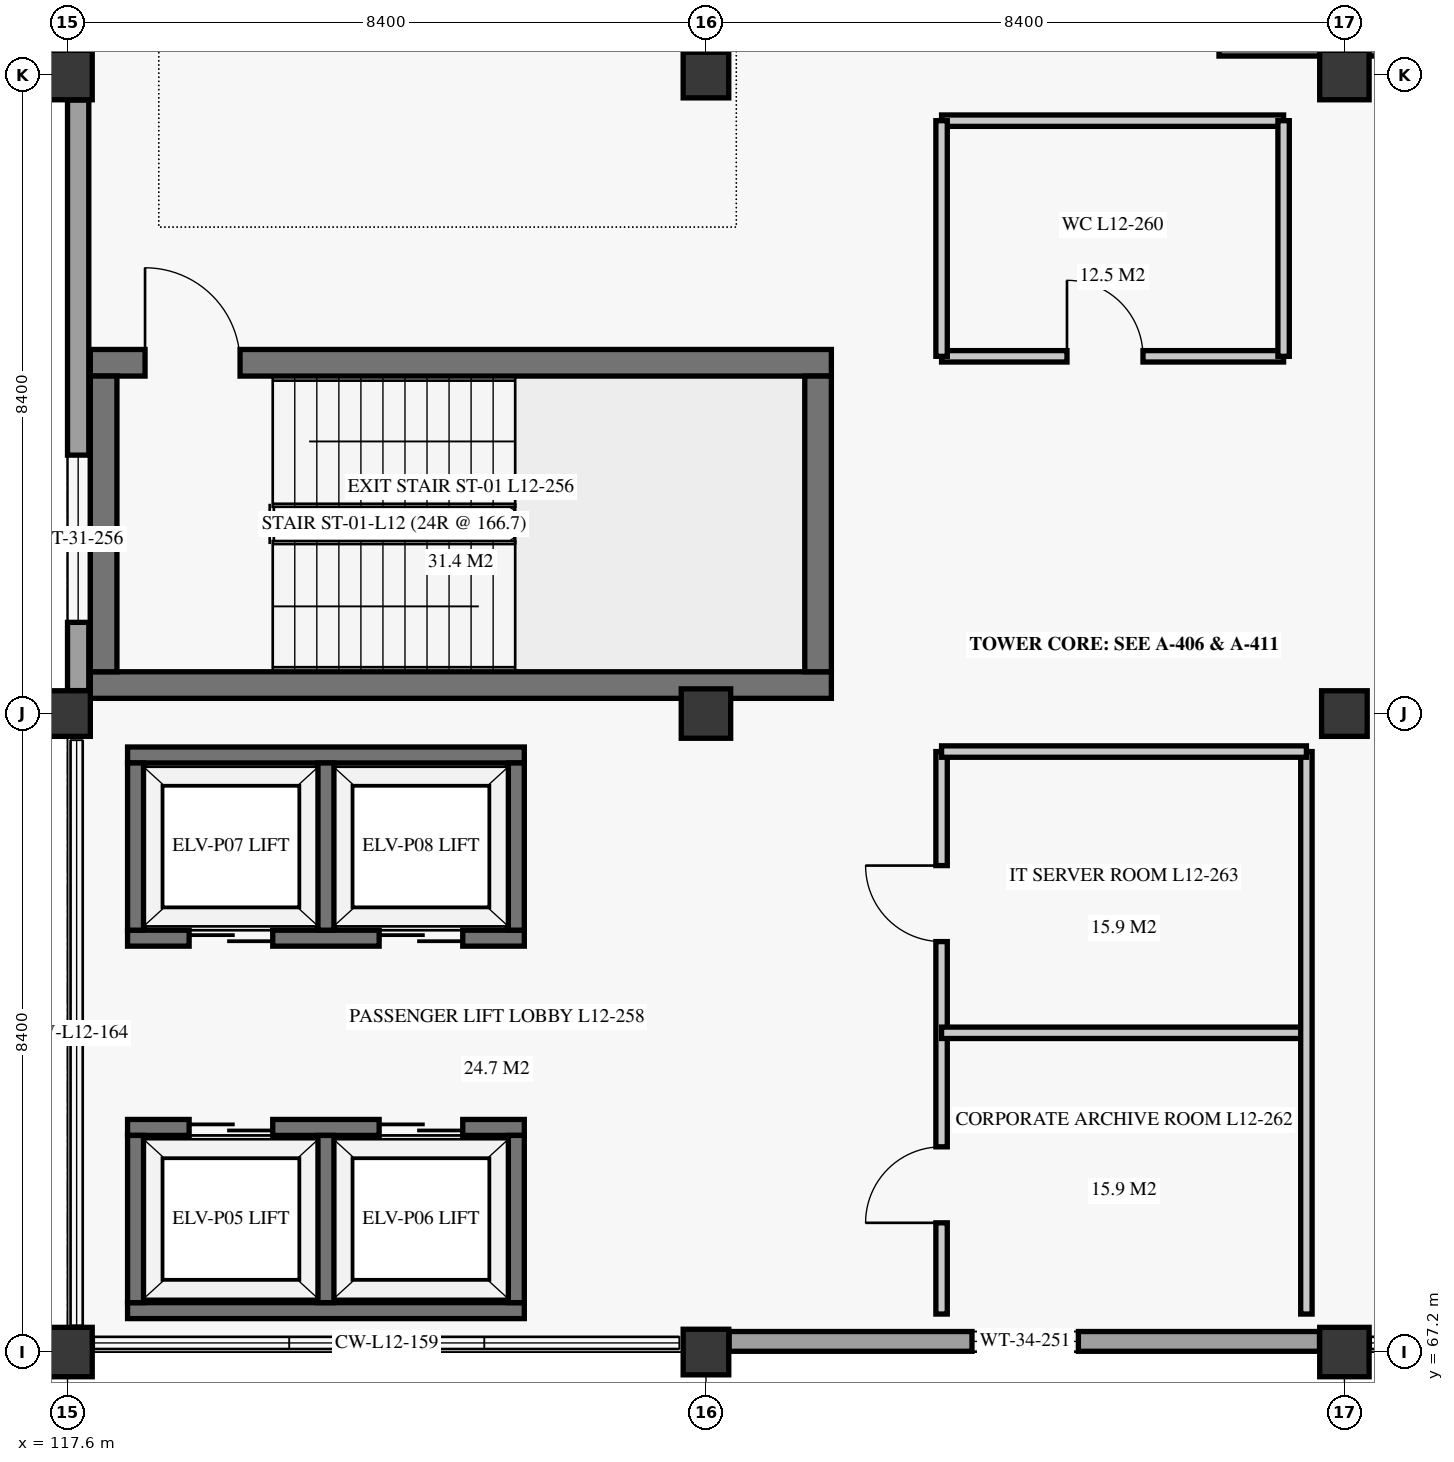
"""IFC4 building model, lengths in metres.
Left out: names, types, materials, properties, quantities, classifications, styles, units other than length and angle.
Written with IfcOpenShell. Run it as: python <this file> out.ifc"""

import sys

from ifc_helpers import new_model, si_unit, direction, frame, frame_2d, origin, origin_2d, place, context, subcontext, project, spatial, rectangle, extrude, element, fill, save


model = new_model("IFC4")
c1 = context("Model", 3, precision=1e-05, world=origin(), true_north=direction((0.0, 1.0)))
c2 = subcontext(c1, "Body", "Model", "MODEL_VIEW")
j1 = project(units=[si_unit("LENGTHUNIT", "METRE"), si_unit("PLANEANGLEUNIT", "RADIAN")], contexts=[c1])
p1 = place(None, origin())
s1 = spatial("IfcSite", under=j1, at=p1, CompositionType="ELEMENT")
p2 = place(p1, origin())
s2 = spatial("IfcBuilding", under=s1, at=p2, CompositionType="ELEMENT")
p3 = place(p2, frame((0.0, 0.0, 50.7)))
s3 = spatial("IfcBuildingStorey", under=s2, at=p3, CompositionType="ELEMENT", Elevation=50.7)
p4 = place(p3, frame((117.6, 67.2, 0.0), z_axis=(0.0, 0.0, 1.0), x_axis=(1.0, 0.0, 0.0)))
e1 = element("IfcColumn", 1, at=p4, inside=s3, PredefinedType="COLUMN", context=c2, shape_type="SweptSolid", body=[
    extrude(rectangle(XDim=0.65, YDim=0.65, at=origin_2d()), origin(), (0.0, 0.0, 1.0), 3.72),
])
p5 = place(p3, frame((117.6, 75.6, 0.0), z_axis=(0.0, 0.0, 1.0), x_axis=(1.0, 0.0, 0.0)))
e2 = element("IfcColumn", 2, at=p5, inside=s3, PredefinedType="COLUMN", context=c2, shape_type="SweptSolid", body=[
    extrude(rectangle(XDim=0.6, YDim=0.6, at=origin_2d()), origin(), (0.0, 0.0, 1.0), 3.72),
])
p6 = place(p3, frame((117.6, 84.0, 0.0), z_axis=(0.0, 0.0, 1.0), x_axis=(1.0, 0.0, 0.0)))
e3 = element("IfcColumn", 3, at=p6, inside=s3, PredefinedType="COLUMN", context=c2, shape_type="SweptSolid", body=[
    extrude(rectangle(XDim=0.65, YDim=0.65, at=origin_2d()), origin(), (0.0, 0.0, 1.0), 3.72),
])
p7 = place(p3, frame((126.0, 67.2, 0.0), z_axis=(0.0, 0.0, 1.0), x_axis=(1.0, 0.0, 0.0)))
e4 = element("IfcColumn", 4, at=p7, inside=s3, PredefinedType="COLUMN", context=c2, shape_type="SweptSolid", body=[
    extrude(rectangle(XDim=0.6, YDim=0.6, at=origin_2d()), origin(), (0.0, 0.0, 1.0), 3.72),
])
p8 = place(p3, frame((126.0, 75.6, 0.0), z_axis=(0.0, 0.0, 1.0), x_axis=(1.0, 0.0, 0.0)))
e5 = element("IfcColumn", 5, at=p8, inside=s3, PredefinedType="COLUMN", context=c2, shape_type="SweptSolid", body=[
    extrude(rectangle(XDim=0.65, YDim=0.65, at=origin_2d()), origin(), (0.0, 0.0, 1.0), 3.72),
])
p9 = place(p3, frame((126.0, 84.0, 0.0), z_axis=(0.0, 0.0, 1.0), x_axis=(1.0, 0.0, 0.0)))
e6 = element("IfcColumn", 6, at=p9, inside=s3, PredefinedType="COLUMN", context=c2, shape_type="SweptSolid", body=[
    extrude(rectangle(XDim=0.6, YDim=0.6, at=origin_2d()), origin(), (0.0, 0.0, 1.0), 3.72),
])
p10 = place(p3, frame((134.4, 67.2, 0.0), z_axis=(0.0, 0.0, 1.0), x_axis=(1.0, 0.0, 0.0)))
e7 = element("IfcColumn", 7, at=p10, inside=s3, PredefinedType="COLUMN", context=c2, shape_type="SweptSolid", body=[
    extrude(rectangle(XDim=0.65, YDim=0.65, at=origin_2d()), origin(), (0.0, 0.0, 1.0), 3.72),
])
p11 = place(p3, frame((134.4, 75.6, 0.0), z_axis=(0.0, 0.0, 1.0), x_axis=(1.0, 0.0, 0.0)))
e8 = element("IfcColumn", 8, at=p11, inside=s3, PredefinedType="COLUMN", context=c2, shape_type="SweptSolid", body=[
    extrude(rectangle(XDim=0.6, YDim=0.6, at=origin_2d()), origin(), (0.0, 0.0, 1.0), 3.72),
])
p12 = place(p3, frame((134.4, 84.0, 0.0), z_axis=(0.0, 0.0, 1.0), x_axis=(1.0, 0.0, 0.0)))
e9 = element("IfcColumn", 9, at=p12, inside=s3, PredefinedType="COLUMN", context=c2, shape_type="SweptSolid", body=[
    extrude(rectangle(XDim=0.65, YDim=0.65, at=origin_2d()), origin(), (0.0, 0.0, 1.0), 3.72),
])
p13 = place(p3, frame((126.304, 67.34, 0.0), z_axis=(0.0, 0.0, 1.0), x_axis=(1.0, 0.0, 0.0)))
e10 = element("IfcWall", 10, at=p13, inside=s3, PredefinedType="SOLIDWALL", context=c2, shape_type="SweptSolid", body=[
    extrude(rectangle(XDim=7.768, YDim=0.26, at=frame_2d((3.884, 0.0))), origin(), (0.0, 0.0, 1.0), 3.04),
])
p14 = place(p13, frame((3.196, 0.0, 0.85)))
e11 = element("IfcOpeningElement", 11, at=p14, cuts=e10, PredefinedType="OPENING", context=c2, shape_type="SweptSolid", body=[
    extrude(rectangle(XDim=1.4, YDim=1.7, at=frame_2d((0.7, 0.85))), frame((0.0, 0.14, 0.0), z_axis=(0.0, -1.0, 0.0), x_axis=(1.0, 0.0, 0.0)), (0.0, 0.0, 1.0), 0.28),
])
p15 = place(p3, frame((117.74, 75.902, 0.0), z_axis=(0.0, 0.0, 1.0), x_axis=(0.0, 1.0, 0.0)))
e12 = element("IfcWall", 12, at=p15, inside=s3, PredefinedType="SOLIDWALL", context=c2, shape_type="SweptSolid", body=[
    extrude(rectangle(XDim=7.77, YDim=0.28, at=frame_2d((3.885, 0.0))), origin(), (0.0, 0.0, 1.0), 3.04),
])
p16 = place(p15, frame((0.898, 0.0, 0.85)))
e13 = element("IfcOpeningElement", 13, at=p16, cuts=e12, PredefinedType="OPENING", context=c2, shape_type="SweptSolid", body=[
    extrude(rectangle(XDim=2.2, YDim=1.8, at=frame_2d((1.1, 0.9))), frame((0.0, 0.15, 0.0), z_axis=(0.0, -1.0, 0.0), x_axis=(1.0, 0.0, 0.0)), (0.0, 0.0, 1.0), 0.3),
])
p17 = place(p3, frame((117.9, 75.975, 0.0), z_axis=(0.0, 0.0, 1.0), x_axis=(1.0, 0.0, 0.0)))
e14 = element("IfcWall", 14, at=p17, inside=s3, PredefinedType="SHEAR", context=c2, shape_type="SweptSolid", body=[
    extrude(rectangle(XDim=9.75, YDim=0.35, at=frame_2d((4.875, 0.0))), origin(), (0.0, 0.0, 1.0), 3.72),
])
p18 = place(p3, frame((117.9, 80.215, 0.0), z_axis=(0.0, 0.0, 1.0), x_axis=(1.0, 0.0, 0.0)))
e15 = element("IfcWall", 15, at=p18, inside=s3, PredefinedType="SHEAR", context=c2, shape_type="SweptSolid", body=[
    extrude(rectangle(XDim=9.75, YDim=0.35, at=frame_2d((4.875, 0.0))), origin(), (0.0, 0.0, 1.0), 3.72),
])
p19 = place(p18, frame((0.72, 0.0, 0.0)))
e16 = element("IfcOpeningElement", 16, at=p19, cuts=e15, PredefinedType="OPENING", context=c2, shape_type="SweptSolid", body=[
    extrude(rectangle(XDim=1.25, YDim=2.2, at=frame_2d((0.625, 1.1))), frame((0.0, 0.185, 0.0), z_axis=(0.0, -1.0, 0.0), x_axis=(1.0, 0.0, 0.0)), (0.0, 0.0, 1.0), 0.37),
])
for number, where, z_axis, x_axis in (
    (17, (118.075, 76.15, 0.0), (0.0, 0.0, 1.0), (0.0, 1.0, 0.0)),
    (18, (127.475, 76.15, 0.0), (0.0, 0.0, 1.0), (0.0, 1.0, 0.0)),
):
    element("IfcWall", number, at=place(p3, frame(where, z_axis=z_axis, x_axis=x_axis)), inside=s3, PredefinedType="SHEAR", context=c2, shape_type="SweptSolid", body=[
        extrude(rectangle(XDim=3.89, YDim=0.35, at=frame_2d((1.945, 0.0))), origin(), (0.0, 0.0, 1.0), 3.72),
    ])
p20 = place(p3, frame((132.75, 84.425, 0.0), z_axis=(0.0, 0.0, 1.0), x_axis=(1.0, 0.0, 0.0)))
e19 = element("IfcWall", 19, at=p20, inside=s3, PredefinedType="SHEAR", context=c2, shape_type="SweptSolid", body=[
    extrude(rectangle(XDim=9.75, YDim=0.35, at=frame_2d((4.875, 0.0))), origin(), (0.0, 0.0, 1.0), 3.72),
])
p21 = place(p3, frame((118.39, 67.745, 0.0), z_axis=(0.0, 0.0, 1.0), x_axis=(1.0, 0.0, 0.0)))
e20 = element("IfcWall", 20, at=p21, inside=s3, PredefinedType="SHEAR", context=c2, shape_type="SweptSolid", body=[
    extrude(rectangle(XDim=5.22, YDim=0.21, at=frame_2d((2.61, 0.0))), origin(), (0.0, 0.0, 1.0), 3.72),
])
p22 = place(p3, frame((118.39, 70.155, 0.0), z_axis=(0.0, 0.0, 1.0), x_axis=(1.0, 0.0, 0.0)))
e21 = element("IfcWall", 21, at=p22, inside=s3, PredefinedType="SHEAR", context=c2, shape_type="SweptSolid", body=[
    extrude(rectangle(XDim=5.22, YDim=0.21, at=frame_2d((2.61, 0.0))), origin(), (0.0, 0.0, 1.0), 3.72),
])
p23 = place(p22, frame((0.81, 0.0, 0.0)))
e22 = element("IfcOpeningElement", 22, at=p23, cuts=e21, PredefinedType="OPENING", context=c2, shape_type="SweptSolid", body=[
    extrude(rectangle(XDim=1.1, YDim=2.15, at=frame_2d((0.55, 1.075))), frame((0.0, 0.115, 0.0), z_axis=(0.0, -1.0, 0.0), x_axis=(1.0, 0.0, 0.0)), (0.0, 0.0, 1.0), 0.23),
])
p24 = place(p22, frame((3.31, 0.0, 0.0)))
e23 = element("IfcOpeningElement", 23, at=p24, cuts=e21, PredefinedType="OPENING", context=c2, shape_type="SweptSolid", body=[
    extrude(rectangle(XDim=1.1, YDim=2.15, at=frame_2d((0.55, 1.075))), frame((0.0, 0.115, 0.0), z_axis=(0.0, -1.0, 0.0), x_axis=(1.0, 0.0, 0.0)), (0.0, 0.0, 1.0), 0.23),
])
for number, where, z_axis, x_axis in (
    (24, (118.495, 67.85, 0.0), (0.0, 0.0, 1.0), (0.0, 1.0, 0.0)),
    (25, (123.505, 67.85, 0.0), (0.0, 0.0, 1.0), (0.0, 1.0, 0.0)),
    (26, (121.0, 67.85, 0.0), (0.0, 0.0, 1.0), (0.0, 1.0, 0.0)),
):
    element("IfcWall", number, at=place(p3, frame(where, z_axis=z_axis, x_axis=x_axis)), inside=s3, PredefinedType="SHEAR", context=c2, shape_type="SweptSolid", body=[
        extrude(rectangle(XDim=2.2, YDim=0.21, at=frame_2d((1.1, 0.0))), origin(), (0.0, 0.0, 1.0), 3.72),
    ])
p25 = place(p3, frame((118.39, 72.645, 0.0), z_axis=(0.0, 0.0, 1.0), x_axis=(1.0, 0.0, 0.0)))
e27 = element("IfcWall", 27, at=p25, inside=s3, PredefinedType="SHEAR", context=c2, shape_type="SweptSolid", body=[
    extrude(rectangle(XDim=5.22, YDim=0.21, at=frame_2d((2.61, 0.0))), origin(), (0.0, 0.0, 1.0), 3.72),
])
p26 = place(p25, frame((0.81, 0.0, 0.0)))
e28 = element("IfcOpeningElement", 28, at=p26, cuts=e27, PredefinedType="OPENING", context=c2, shape_type="SweptSolid", body=[
    extrude(rectangle(XDim=1.1, YDim=2.15, at=frame_2d((0.55, 1.075))), frame((0.0, 0.115, 0.0), z_axis=(0.0, -1.0, 0.0), x_axis=(1.0, 0.0, 0.0)), (0.0, 0.0, 1.0), 0.23),
])
p27 = place(p25, frame((3.31, 0.0, 0.0)))
e29 = element("IfcOpeningElement", 29, at=p27, cuts=e27, PredefinedType="OPENING", context=c2, shape_type="SweptSolid", body=[
    extrude(rectangle(XDim=1.1, YDim=2.15, at=frame_2d((0.55, 1.075))), frame((0.0, 0.115, 0.0), z_axis=(0.0, -1.0, 0.0), x_axis=(1.0, 0.0, 0.0)), (0.0, 0.0, 1.0), 0.23),
])
p28 = place(p3, frame((118.39, 75.055, 0.0), z_axis=(0.0, 0.0, 1.0), x_axis=(1.0, 0.0, 0.0)))
e30 = element("IfcWall", 30, at=p28, inside=s3, PredefinedType="SHEAR", context=c2, shape_type="SweptSolid", body=[
    extrude(rectangle(XDim=5.22, YDim=0.21, at=frame_2d((2.61, 0.0))), origin(), (0.0, 0.0, 1.0), 3.72),
])
for number, where, z_axis, x_axis in (
    (31, (118.495, 72.75, 0.0), (0.0, 0.0, 1.0), (0.0, 1.0, 0.0)),
    (32, (123.505, 72.75, 0.0), (0.0, 0.0, 1.0), (0.0, 1.0, 0.0)),
    (33, (121.0, 72.75, 0.0), (0.0, 0.0, 1.0), (0.0, 1.0, 0.0)),
):
    element("IfcWall", number, at=place(p3, frame(where, z_axis=z_axis, x_axis=x_axis)), inside=s3, PredefinedType="SHEAR", context=c2, shape_type="SweptSolid", body=[
        extrude(rectangle(XDim=2.2, YDim=0.21, at=frame_2d((1.1, 0.0))), origin(), (0.0, 0.0, 1.0), 3.72),
    ])
p29 = place(p3, frame((129.1, 80.3, 0.0), z_axis=(0.0, 0.0, 1.0), x_axis=(1.0, 0.0, 0.0)))
e34 = element("IfcWall", 34, at=p29, inside=s3, PredefinedType="PARTITIONING", context=c2, shape_type="SweptSolid", body=[
    extrude(rectangle(XDim=4.5, YDim=0.15, at=frame_2d((2.25, 0.0))), origin(), (0.0, 0.0, 1.0), 3.34),
])
p30 = place(p29, frame((1.65, 0.0, 0.0)))
e35 = element("IfcOpeningElement", 35, at=p30, cuts=e34, PredefinedType="OPENING", context=c2, shape_type="SweptSolid", body=[
    extrude(rectangle(XDim=1.0, YDim=2.1, at=frame_2d((0.5, 1.05))), frame((0.0, 0.085, 0.0), z_axis=(0.0, -1.0, 0.0), x_axis=(1.0, 0.0, 0.0)), (0.0, 0.0, 1.0), 0.17),
])
p31 = place(p3, frame((129.1, 83.4, 0.0), z_axis=(0.0, 0.0, 1.0), x_axis=(1.0, 0.0, 0.0)))
e36 = element("IfcWall", 36, at=p31, inside=s3, PredefinedType="PARTITIONING", context=c2, shape_type="SweptSolid", body=[
    extrude(rectangle(XDim=4.5, YDim=0.15, at=frame_2d((2.25, 0.0))), origin(), (0.0, 0.0, 1.0), 3.34),
])
for number, where, z_axis, x_axis in (
    (37, (129.1, 80.3, 0.0), (0.0, 0.0, 1.0), (0.0, 1.0, 0.0)),
    (38, (133.6, 80.3, 0.0), (0.0, 0.0, 1.0), (0.0, 1.0, 0.0)),
):
    element("IfcWall", number, at=place(p3, frame(where, z_axis=z_axis, x_axis=x_axis)), inside=s3, PredefinedType="PARTITIONING", context=c2, shape_type="SweptSolid", body=[
        extrude(rectangle(XDim=3.1, YDim=0.15, at=frame_2d((1.55, 0.0))), origin(), (0.0, 0.0, 1.0), 3.34),
    ])
p32 = place(p3, frame((129.1, 67.7, 0.0), z_axis=(0.0, 0.0, 1.0), x_axis=(0.0, 1.0, 0.0)))
e39 = element("IfcWall", 39, at=p32, inside=s3, PredefinedType="PARTITIONING", context=c2, shape_type="SweptSolid", body=[
    extrude(rectangle(XDim=7.4, YDim=0.15, at=frame_2d((3.7, 0.0))), origin(), (0.0, 0.0, 1.0), 3.34),
])
p33 = place(p32, frame((1.2, 0.0, 0.0)))
e40 = element("IfcOpeningElement", 40, at=p33, cuts=e39, PredefinedType="OPENING", context=c2, shape_type="SweptSolid", body=[
    extrude(rectangle(XDim=1.0, YDim=2.1, at=frame_2d((0.5, 1.05))), frame((0.0, 0.085, 0.0), z_axis=(0.0, -1.0, 0.0), x_axis=(1.0, 0.0, 0.0)), (0.0, 0.0, 1.0), 0.17),
])
p34 = place(p32, frame((4.9, 0.0, 0.0)))
e41 = element("IfcOpeningElement", 41, at=p34, cuts=e39, PredefinedType="OPENING", context=c2, shape_type="SweptSolid", body=[
    extrude(rectangle(XDim=1.0, YDim=2.1, at=frame_2d((0.5, 1.05))), frame((0.0, 0.085, 0.0), z_axis=(0.0, -1.0, 0.0), x_axis=(1.0, 0.0, 0.0)), (0.0, 0.0, 1.0), 0.17),
])
p35 = place(p3, frame((129.1, 71.4, 0.0), z_axis=(0.0, 0.0, 1.0), x_axis=(1.0, 0.0, 0.0)))
e42 = element("IfcWall", 42, at=p35, inside=s3, PredefinedType="PARTITIONING", context=c2, shape_type="SweptSolid", body=[
    extrude(rectangle(XDim=4.8, YDim=0.15, at=frame_2d((2.4, 0.0))), origin(), (0.0, 0.0, 1.0), 3.34),
])
p36 = place(p3, frame((133.9, 67.7, 0.0), z_axis=(0.0, 0.0, 1.0), x_axis=(0.0, 1.0, 0.0)))
e43 = element("IfcWall", 43, at=p36, inside=s3, PredefinedType="PARTITIONING", context=c2, shape_type="SweptSolid", body=[
    extrude(rectangle(XDim=7.4, YDim=0.15, at=frame_2d((3.7, 0.0))), origin(), (0.0, 0.0, 1.0), 3.34),
])
p37 = place(p3, frame((129.1, 75.1, 0.0), z_axis=(0.0, 0.0, 1.0), x_axis=(1.0, 0.0, 0.0)))
e44 = element("IfcWall", 44, at=p37, inside=s3, PredefinedType="PARTITIONING", context=c2, shape_type="SweptSolid", body=[
    extrude(rectangle(XDim=4.8, YDim=0.15, at=frame_2d((2.4, 0.0))), origin(), (0.0, 0.0, 1.0), 3.34),
])
p38 = place(p14, origin())
e45 = element("IfcWindow", 45, at=p38, inside=s3, PartitioningType="SINGLE_PANEL", PredefinedType="WINDOW", context=c2, shape_type="SweptSolid", body=[
    extrude(rectangle(XDim=1.4, YDim=1.7, at=frame_2d((0.7, 0.85))), frame((0.0, 0.03, 0.0), z_axis=(0.0, -1.0, 0.0), x_axis=(1.0, 0.0, 0.0)), (0.0, 0.0, 1.0), 0.06),
])
fill(e11, e45)
p39 = place(p16, origin())
e46 = element("IfcWindow", 46, at=p39, inside=s3, PartitioningType="SINGLE_PANEL", PredefinedType="WINDOW", context=c2, shape_type="SweptSolid", body=[
    extrude(rectangle(XDim=2.2, YDim=1.8, at=frame_2d((1.1, 0.9))), frame((0.0, 0.03, 0.0), z_axis=(0.0, -1.0, 0.0), x_axis=(1.0, 0.0, 0.0)), (0.0, 0.0, 1.0), 0.06),
])
fill(e13, e46)
p40 = place(p19, origin())
e47 = element("IfcDoor", 47, at=p40, inside=s3, OperationType="SINGLE_SWING_LEFT", PredefinedType="DOOR", context=c2, shape_type="SweptSolid", body=[
    extrude(rectangle(XDim=1.25, YDim=2.2, at=frame_2d((0.625, 1.1))), frame((0.0, 0.025, 0.0), z_axis=(0.0, -1.0, 0.0), x_axis=(1.0, 0.0, 0.0)), (0.0, 0.0, 1.0), 0.05),
])
fill(e16, e47)
p41 = place(p23, origin())
e48 = element("IfcDoor", 48, at=p41, inside=s3, OperationType="DOUBLE_DOOR_SLIDING", PredefinedType="DOOR", context=c2, shape_type="SweptSolid", body=[
    extrude(rectangle(XDim=1.1, YDim=2.15, at=frame_2d((0.55, 1.075))), frame((0.0, 0.025, 0.0), z_axis=(0.0, -1.0, 0.0), x_axis=(1.0, 0.0, 0.0)), (0.0, 0.0, 1.0), 0.05),
])
fill(e22, e48)
p42 = place(p24, origin())
e49 = element("IfcDoor", 49, at=p42, inside=s3, OperationType="DOUBLE_DOOR_SLIDING", PredefinedType="DOOR", context=c2, shape_type="SweptSolid", body=[
    extrude(rectangle(XDim=1.1, YDim=2.15, at=frame_2d((0.55, 1.075))), frame((0.0, 0.025, 0.0), z_axis=(0.0, -1.0, 0.0), x_axis=(1.0, 0.0, 0.0)), (0.0, 0.0, 1.0), 0.05),
])
fill(e23, e49)
p43 = place(p26, origin())
e50 = element("IfcDoor", 50, at=p43, inside=s3, OperationType="DOUBLE_DOOR_SLIDING", PredefinedType="DOOR", context=c2, shape_type="SweptSolid", body=[
    extrude(rectangle(XDim=1.1, YDim=2.15, at=frame_2d((0.55, 1.075))), frame((0.0, 0.025, 0.0), z_axis=(0.0, -1.0, 0.0), x_axis=(1.0, 0.0, 0.0)), (0.0, 0.0, 1.0), 0.05),
])
fill(e28, e50)
p44 = place(p27, origin())
e51 = element("IfcDoor", 51, at=p44, inside=s3, OperationType="DOUBLE_DOOR_SLIDING", PredefinedType="DOOR", context=c2, shape_type="SweptSolid", body=[
    extrude(rectangle(XDim=1.1, YDim=2.15, at=frame_2d((0.55, 1.075))), frame((0.0, 0.025, 0.0), z_axis=(0.0, -1.0, 0.0), x_axis=(1.0, 0.0, 0.0)), (0.0, 0.0, 1.0), 0.05),
])
fill(e29, e51)
p45 = place(p30, origin())
e52 = element("IfcDoor", 52, at=p45, inside=s3, OperationType="SINGLE_SWING_LEFT", PredefinedType="DOOR", context=c2, shape_type="SweptSolid", body=[
    extrude(rectangle(XDim=1.0, YDim=2.1, at=frame_2d((0.5, 1.05))), frame((0.0, 0.025, 0.0), z_axis=(0.0, -1.0, 0.0), x_axis=(1.0, 0.0, 0.0)), (0.0, 0.0, 1.0), 0.05),
])
fill(e35, e52)
p46 = place(p33, origin())
e53 = element("IfcDoor", 53, at=p46, inside=s3, OperationType="SINGLE_SWING_LEFT", PredefinedType="DOOR", context=c2, shape_type="SweptSolid", body=[
    extrude(rectangle(XDim=1.0, YDim=2.1, at=frame_2d((0.5, 1.05))), frame((0.0, 0.025, 0.0), z_axis=(0.0, -1.0, 0.0), x_axis=(1.0, 0.0, 0.0)), (0.0, 0.0, 1.0), 0.05),
])
fill(e40, e53)
p47 = place(p34, origin())
e54 = element("IfcDoor", 54, at=p47, inside=s3, OperationType="SINGLE_SWING_RIGHT", PredefinedType="DOOR", context=c2, shape_type="SweptSolid", body=[
    extrude(rectangle(XDim=1.0, YDim=2.1, at=frame_2d((0.5, 1.05))), frame((0.0, 0.025, 0.0), z_axis=(0.0, -1.0, 0.0), x_axis=(1.0, 0.0, 0.0)), (0.0, 0.0, 1.0), 0.05),
])
fill(e41, e54)
save(model, sys.argv[1])
